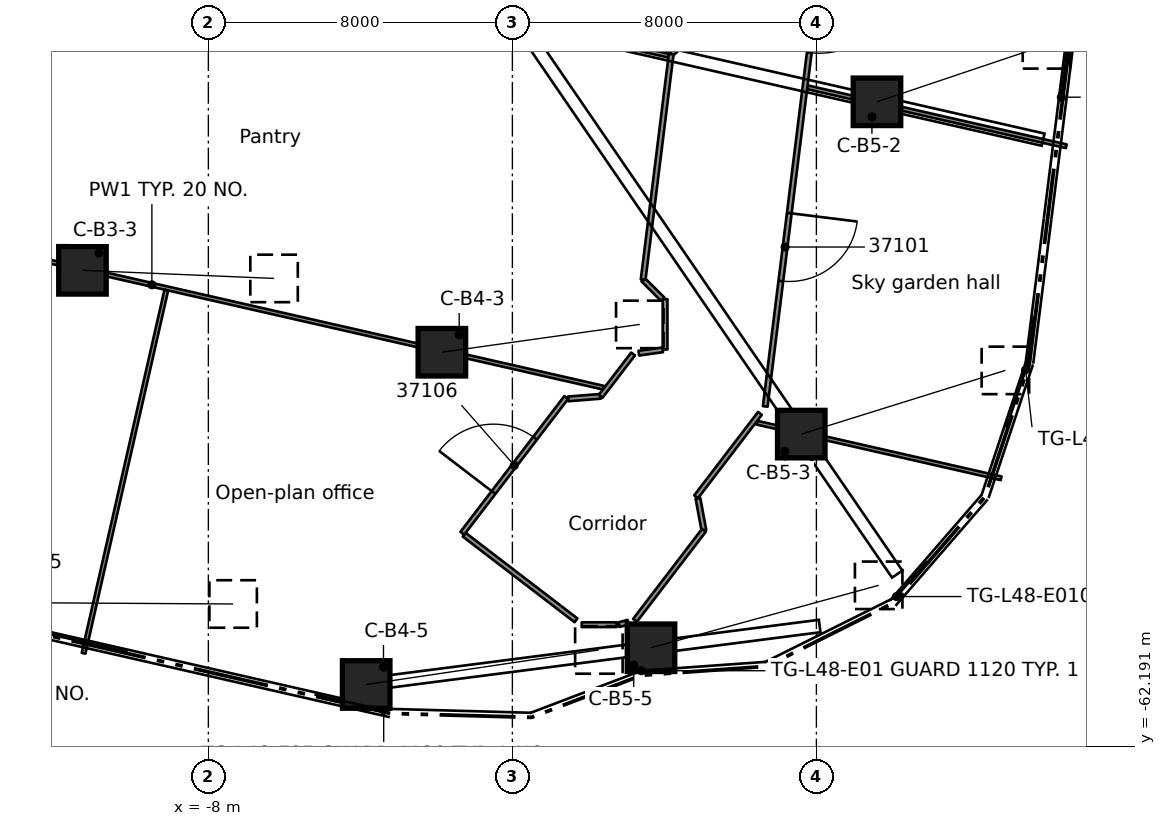
"""IFC4 building model, lengths in metres.
Left out: names, types, materials, properties, quantities, classifications, styles, units other than length and angle.
Written with IfcOpenShell. Run it as: python <this file> out.ifc"""

import sys

from ifc_helpers import new_model, si_unit, direction, frame, frame_2d, origin, origin_2d, place, context, subcontext, project, spatial, rectangle, extrude, element, fill, save


model = new_model("IFC4")
c1 = context("Model", 3, precision=1e-05, world=origin(), true_north=direction((0.0, 1.0)))
c2 = subcontext(c1, "Body", "Model", "MODEL_VIEW")
j1 = project(units=[si_unit("LENGTHUNIT", "METRE"), si_unit("PLANEANGLEUNIT", "RADIAN")], contexts=[c1])
p1 = place(None, origin())
s1 = spatial("IfcSite", under=j1, at=p1, CompositionType="ELEMENT")
p2 = place(p1, origin())
s2 = spatial("IfcBuilding", under=s1, at=p2, CompositionType="ELEMENT")
p3 = place(p2, frame((0.0, 0.0, 184.6)))
s3 = spatial("IfcBuildingStorey", under=s2, at=p3, CompositionType="ELEMENT", Elevation=184.6)
p4 = place(p3, frame((-11.313, -49.661, 0.541), z_axis=(0.864946051901, -0.036562943217, 0.500531196314), x_axis=(0.042234217254, 0.99910773738, 0.0)))
e1 = element("IfcColumn", 1, at=p4, inside=s3, PredefinedType="COLUMN", context=c2, shape_type="SweptSolid", body=[
    extrude(rectangle(XDim=1.25, YDim=1.25, at=origin_2d()), origin(), (0.0, 0.0, 1.0), 5.829),
])
p5 = place(p3, frame((-13.305, -58.404, 0.563), z_axis=(0.900629552041, -0.005425923941, 0.43455375886), x_axis=(0.006024480834, 0.999981852651, 0.0)))
e2 = element("IfcColumn", 2, at=p5, inside=s3, PredefinedType="COLUMN", context=c2, shape_type="SweptSolid", body=[
    extrude(rectangle(XDim=1.25, YDim=1.25, at=origin_2d()), origin(), (0.0, 0.0, 1.0), 6.614),
])
p6 = place(p3, frame((-1.855, -51.816, 0.547), z_axis=(0.866750926043, 0.121813204401, 0.483636615071), x_axis=(-0.139172323167, 0.990268178053, 0.0)))
e3 = element("IfcColumn", 3, at=p6, inside=s3, PredefinedType="COLUMN", context=c2, shape_type="SweptSolid", body=[
    extrude(rectangle(XDim=1.25, YDim=1.25, at=origin_2d()), origin(), (0.0, 0.0, 1.0), 6.009),
])
p7 = place(p3, frame((-3.847, -60.558, 0.567), z_axis=(0.897654780078, 0.133150276402, 0.420103439283), x_axis=(-0.146725911516, 0.989177186802, 0.0)))
e4 = element("IfcColumn", 4, at=p7, inside=s3, PredefinedType="COLUMN", context=c2, shape_type="SweptSolid", body=[
    extrude(rectangle(XDim=1.25, YDim=1.25, at=origin_2d()), origin(), (0.0, 0.0, 1.0), 6.821),
])
p8 = place(p3, frame((9.594, -45.227, 0.53), z_axis=(0.80385086955, 0.270179786459, 0.529930809174), x_axis=(-0.318592879429, 0.947891648437, 0.0)))
e5 = element("IfcColumn", 5, at=p8, inside=s3, PredefinedType="COLUMN", context=c2, shape_type="SweptSolid", body=[
    extrude(rectangle(XDim=1.25, YDim=1.25, at=origin_2d()), origin(), (0.0, 0.0, 1.0), 5.548),
])
p9 = place(p3, frame((7.602, -53.97, 0.556), z_axis=(0.849255984591, 0.265018516033, 0.456650258727), x_axis=(-0.297892000092, 0.954599579028, 0.0)))
e6 = element("IfcColumn", 6, at=p9, inside=s3, PredefinedType="COLUMN", context=c2, shape_type="SweptSolid", body=[
    extrude(rectangle(XDim=1.25, YDim=1.25, at=origin_2d()), origin(), (0.0, 0.0, 1.0), 6.324),
])
p10 = place(p3, frame((3.648, -59.592, 0.567), z_axis=(0.875742075193, 0.240178661154, 0.418795926989), x_axis=(-0.264490530984, 0.964388282291, 0.0)))
e7 = element("IfcColumn", 7, at=p10, inside=s3, PredefinedType="COLUMN", context=c2, shape_type="SweptSolid", body=[
    extrude(rectangle(XDim=1.25, YDim=1.25, at=origin_2d()), origin(), (0.0, 0.0, 1.0), 6.841),
])
p11 = place(p3, frame((1.469, -53.044, 0.0), z_axis=(0.0, 0.0, 1.0), x_axis=(0.996856824523, 0.079224184453, 0.0)))
e8 = element("IfcWall", 8, at=p11, inside=s3, PredefinedType="PARTITIONING", context=c2, shape_type="SweptSolid", body=[
    extrude(rectangle(XDim=0.857, YDim=0.125, at=frame_2d((0.428, 0.0))), origin(), (0.0, 0.0, 1.0), 3.56),
])
p12 = place(p3, frame((-1.267, -56.618, 0.0), z_axis=(0.0, 0.0, 1.0), x_axis=(0.793957338067, -0.607973474199, 0.0)))
e9 = element("IfcWall", 9, at=p12, inside=s3, PredefinedType="PARTITIONING", context=c2, shape_type="SweptSolid", body=[
    extrude(rectangle(XDim=3.704, YDim=0.125, at=frame_2d((1.852, 0.0))), origin(), (0.0, 0.0, 1.0), 3.56),
])
p13 = place(p3, frame((4.883, -55.659, 0.0), z_axis=(0.0, 0.0, 1.0), x_axis=(0.183067904458, -0.983100270754, 0.0)))
e10 = element("IfcWall", 10, at=p13, inside=s3, PredefinedType="PARTITIONING", context=c2, shape_type="SweptSolid", body=[
    extrude(rectangle(XDim=0.857, YDim=0.125, at=frame_2d((0.429, 0.0))), origin(), (0.0, 0.0, 1.0), 3.56),
])
p14 = place(p3, frame((-21.364, -47.337, 0.0), z_axis=(0.0, 0.0, 1.0), x_axis=(0.975026141861, -0.222090122894, 0.0)))
e11 = element("IfcWall", 11, at=p14, inside=s3, PredefinedType="PARTITIONING", context=c2, shape_type="SweptSolid", body=[
    extrude(rectangle(XDim=24.365, YDim=0.1, at=frame_2d((12.182, 0.0))), origin(), (0.0, 0.0, 1.0), 3.56),
])
p15 = place(p3, frame((6.432, -53.669, 0.0), z_axis=(0.0, 0.0, 1.0), x_axis=(0.975036744578, -0.222043569425, 0.0)))
e12 = element("IfcWall", 12, at=p15, inside=s3, PredefinedType="PARTITIONING", context=c2, shape_type="SweptSolid", body=[
    extrude(rectangle(XDim=6.594, YDim=0.1, at=frame_2d((3.297, 0.0))), origin(), (0.0, 0.0, 1.0), 3.56),
])
p16 = place(p3, frame((-10.605, -40.66, 0.0), z_axis=(0.0, 0.0, 1.0), x_axis=(0.975014665888, -0.222140499018, 0.0)))
e13 = element("IfcWall", 13, at=p16, inside=s3, PredefinedType="PARTITIONING", context=c2, shape_type="SweptSolid", body=[
    extrude(rectangle(XDim=15.094, YDim=0.1, at=frame_2d((7.547, 0.0))), origin(), (0.0, 0.0, 1.0), 3.56),
])
p17 = place(p3, frame((7.762, -44.844, 0.0), z_axis=(0.0, 0.0, 1.0), x_axis=(0.97502842399, -0.222080103594, 0.0)))
e14 = element("IfcWall", 14, at=p17, inside=s3, PredefinedType="PARTITIONING", context=c2, shape_type="SweptSolid", body=[
    extrude(rectangle(XDim=6.989, YDim=0.1, at=frame_2d((3.494, 0.0))), origin(), (0.0, 0.0, 1.0), 3.56),
])
p18 = place(p3, frame((1.824, -58.985, 0.0), z_axis=(0.0, 0.0, 1.0), x_axis=(1.0, 0.0, 0.0)))
e15 = element("IfcWall", 15, at=p18, inside=s3, PredefinedType="PARTITIONING", context=c2, shape_type="SweptSolid", body=[
    extrude(rectangle(XDim=0.92, YDim=0.125, at=frame_2d((0.46, 0.0))), origin(), (0.0, 0.0, 1.0), 3.56),
])
p19 = place(p3, frame((3.441, -49.907, 0.0), z_axis=(0.0, 0.0, 1.0), x_axis=(0.707946674324, -0.706265889247, 0.0)))
e16 = element("IfcWall", 16, at=p19, inside=s3, PredefinedType="PARTITIONING", context=c2, shape_type="SweptSolid", body=[
    extrude(rectangle(XDim=0.726, YDim=0.125, at=frame_2d((0.363, 0.0))), origin(), (0.0, 0.0, 1.0), 3.56),
])
p20 = place(p3, frame((4.179, -43.973, 0.0), z_axis=(0.0, 0.0, 1.0), x_axis=(0.735423785208, 0.677607449893, 0.0)))
e17 = element("IfcWall", 17, at=p20, inside=s3, PredefinedType="PARTITIONING", context=c2, shape_type="SweptSolid", body=[
    extrude(rectangle(XDim=1.161, YDim=0.125, at=frame_2d((0.581, 0.0))), origin(), (0.0, 0.0, 1.0), 3.56),
])
p21 = place(p3, frame((3.327, -51.841, 0.0), z_axis=(0.0, 0.0, 1.0), x_axis=(0.990117840242, 0.140237878032, 0.0)))
e18 = element("IfcWall", 18, at=p21, inside=s3, PredefinedType="PARTITIONING", context=c2, shape_type="SweptSolid", body=[
    extrude(rectangle(XDim=0.635, YDim=0.125, at=frame_2d((0.318, 0.0))), origin(), (0.0, 0.0, 1.0), 3.56),
])
p22 = place(p3, frame((2.806, -58.985, 0.0), z_axis=(0.0, 0.0, 1.0), x_axis=(0.964651529942, 0.263528794974, 0.0)))
e19 = element("IfcWall", 19, at=p22, inside=s3, PredefinedType="PARTITIONING", context=c2, shape_type="SweptSolid", body=[
    extrude(rectangle(XDim=0.251, YDim=0.125, at=frame_2d((0.125, 0.0))), origin(), (0.0, 0.0, 1.0), 3.56),
])
p23 = place(p3, frame((-11.505, -43.435, 0.0), z_axis=(0.0, 0.0, 1.0), x_axis=(-0.940003814224, -0.341163933095, 0.0)))
e20 = element("IfcWall", 20, at=p23, inside=s3, PredefinedType="PARTITIONING", context=c2, shape_type="SweptSolid", body=[
    extrude(rectangle(XDim=9.986, YDim=0.125, at=frame_2d((4.993, 0.0))), origin(), (0.0, 0.0, 1.0), 3.56),
])
p24 = place(p23, frame((4.48, 0.0, 0.0)))
e21 = element("IfcOpeningElement", 21, at=p24, cuts=e20, PredefinedType="OPENING", context=c2, shape_type="SweptSolid", body=[
    extrude(rectangle(XDim=0.9, YDim=2.1, at=frame_2d((0.45, 1.05))), frame((0.0, 0.073, 0.0), z_axis=(0.0, -1.0, 0.0), x_axis=(1.0, 0.0, 0.0)), (0.0, 0.0, 1.0), 0.145),
])
p25 = place(p3, frame((3.176, -51.862, 0.0), z_axis=(0.0, 0.0, 1.0), x_axis=(-0.607960208504, -0.793967496108, 0.0)))
e22 = element("IfcWall", 22, at=p25, inside=s3, PredefinedType="PARTITIONING", context=c2, shape_type="SweptSolid", body=[
    extrude(rectangle(XDim=1.403, YDim=0.125, at=frame_2d((0.702, 0.0))), origin(), (0.0, 0.0, 1.0), 3.56),
])
p26 = place(p3, frame((3.227, -58.87, 0.0), z_axis=(0.0, 0.0, 1.0), x_axis=(0.607881473211, 0.794027779443, 0.0)))
e23 = element("IfcWall", 23, at=p26, inside=s3, PredefinedType="PARTITIONING", context=c2, shape_type="SweptSolid", body=[
    extrude(rectangle(XDim=2.982, YDim=0.125, at=frame_2d((1.491, 0.0))), origin(), (0.0, 0.0, 1.0), 3.56),
])
p27 = place(p3, frame((4.833, -55.621, 0.0), z_axis=(0.0, 0.0, 1.0), x_axis=(0.607810491172, 0.794082115918, 0.0)))
e24 = element("IfcWall", 24, at=p27, inside=s3, PredefinedType="PARTITIONING", context=c2, shape_type="SweptSolid", body=[
    extrude(rectangle(XDim=2.766, YDim=0.125, at=frame_2d((1.383, 0.0))), origin(), (0.0, 0.0, 1.0), 3.56),
])
p28 = place(p3, frame((-1.317, -56.58, 0.0), z_axis=(0.0, 0.0, 1.0), x_axis=(0.607810548227, 0.794082072247, 0.0)))
e25 = element("IfcWall", 25, at=p28, inside=s3, PredefinedType="PARTITIONING", context=c2, shape_type="SweptSolid", body=[
    extrude(rectangle(XDim=4.5, YDim=0.125, at=frame_2d((2.25, 0.0))), origin(), (0.0, 0.0, 1.0), 3.56),
])
p29 = place(p28, frame((1.35, 0.0, 0.0)))
e26 = element("IfcOpeningElement", 26, at=p29, cuts=e25, PredefinedType="OPENING", context=c2, shape_type="SweptSolid", body=[
    extrude(rectangle(XDim=1.8, YDim=2.1, at=frame_2d((0.9, 1.05))), frame((0.0, 0.073, 0.0), z_axis=(0.0, -1.0, 0.0), x_axis=(1.0, 0.0, 0.0)), (0.0, 0.0, 1.0), 0.145),
])
p30 = place(p3, frame((-11.283, -59.736, 0.0), z_axis=(0.0, 0.0, 1.0), x_axis=(0.222142221774, 0.975014273385, 0.0)))
e27 = element("IfcWall", 27, at=p30, inside=s3, PredefinedType="PARTITIONING", context=c2, shape_type="SweptSolid", body=[
    extrude(rectangle(XDim=9.8, YDim=0.1, at=frame_2d((4.9, 0.0))), origin(), (0.0, 0.0, 1.0), 3.56),
])
p31 = place(p3, frame((8.127, -41.409, 0.0), z_axis=(0.0, 0.0, 1.0), x_axis=(-0.123520658821, -0.992342000948, 0.0)))
e28 = element("IfcWall", 28, at=p31, inside=s3, PredefinedType="PARTITIONING", context=c2, shape_type="SweptSolid", body=[
    extrude(rectangle(XDim=11.924, YDim=0.125, at=frame_2d((5.962, 0.0))), origin(), (0.0, 0.0, 1.0), 3.56),
])
p32 = place(p31, frame((0.443, 0.0, 0.0)))
e29 = element("IfcOpeningElement", 29, at=p32, cuts=e28, PredefinedType="OPENING", context=c2, shape_type="SweptSolid", body=[
    extrude(rectangle(XDim=2.1, YDim=2.1, at=frame_2d((1.05, 1.05))), frame((0.0, 0.073, 0.0), z_axis=(0.0, -1.0, 0.0), x_axis=(1.0, 0.0, 0.0)), (0.0, 0.0, 1.0), 0.145),
])
p33 = place(p31, frame((6.798, 0.0, 0.0)))
e30 = element("IfcOpeningElement", 30, at=p33, cuts=e28, PredefinedType="OPENING", context=c2, shape_type="SweptSolid", body=[
    extrude(rectangle(XDim=1.8, YDim=2.1, at=frame_2d((0.9, 1.05))), frame((0.0, 0.073, 0.0), z_axis=(0.0, -1.0, 0.0), x_axis=(1.0, 0.0, 0.0)), (0.0, 0.0, 1.0), 0.145),
])
p34 = place(p3, frame((3.441, -49.907, 0.0), z_axis=(0.0, 0.0, 1.0), x_axis=(0.123421669621, 0.992354317504, 0.0)))
e31 = element("IfcWall", 31, at=p34, inside=s3, PredefinedType="PARTITIONING", context=c2, shape_type="SweptSolid", body=[
    extrude(rectangle(XDim=5.98, YDim=0.125, at=frame_2d((2.99, 0.0))), origin(), (0.0, 0.0, 1.0), 3.56),
])
p35 = place(p3, frame((4.018, -51.743, 0.0), z_axis=(0.0, 0.0, 1.0), x_axis=(0.0, 1.0, 0.0)))
e32 = element("IfcWall", 32, at=p35, inside=s3, PredefinedType="PARTITIONING", context=c2, shape_type="SweptSolid", body=[
    extrude(rectangle(XDim=1.323, YDim=0.125, at=frame_2d((0.662, 0.0))), origin(), (0.0, 0.0, 1.0), 3.56),
])
p36 = place(p32, origin())
e33 = element("IfcDoor", 33, at=p36, inside=s3, OperationType="DOUBLE_DOOR_SINGLE_SWING", PredefinedType="DOOR", context=c2, shape_type="SweptSolid", body=[
    extrude(rectangle(XDim=2.1, YDim=2.1, at=frame_2d((1.05, 1.05))), frame((0.0, 0.025, 0.0), z_axis=(0.0, -1.0, 0.0), x_axis=(1.0, 0.0, 0.0)), (0.0, 0.0, 1.0), 0.05),
])
fill(e29, e33)
p37 = place(p33, origin())
e34 = element("IfcDoor", 34, at=p37, inside=s3, OperationType="DOUBLE_DOOR_SINGLE_SWING", PredefinedType="DOOR", context=c2, shape_type="SweptSolid", body=[
    extrude(rectangle(XDim=1.8, YDim=2.1, at=frame_2d((0.9, 1.05))), frame((0.0, 0.025, 0.0), z_axis=(0.0, -1.0, 0.0), x_axis=(1.0, 0.0, 0.0)), (0.0, 0.0, 1.0), 0.05),
])
fill(e30, e34)
p38 = place(p29, origin())
e35 = element("IfcDoor", 35, at=p38, inside=s3, OperationType="DOUBLE_DOOR_SINGLE_SWING", PredefinedType="DOOR", context=c2, shape_type="SweptSolid", body=[
    extrude(rectangle(XDim=1.8, YDim=2.1, at=frame_2d((0.9, 1.05))), frame((0.0, 0.025, 0.0), z_axis=(0.0, -1.0, 0.0), x_axis=(1.0, 0.0, 0.0)), (0.0, 0.0, 1.0), 0.05),
])
fill(e26, e35)
save(model, sys.argv[1])
